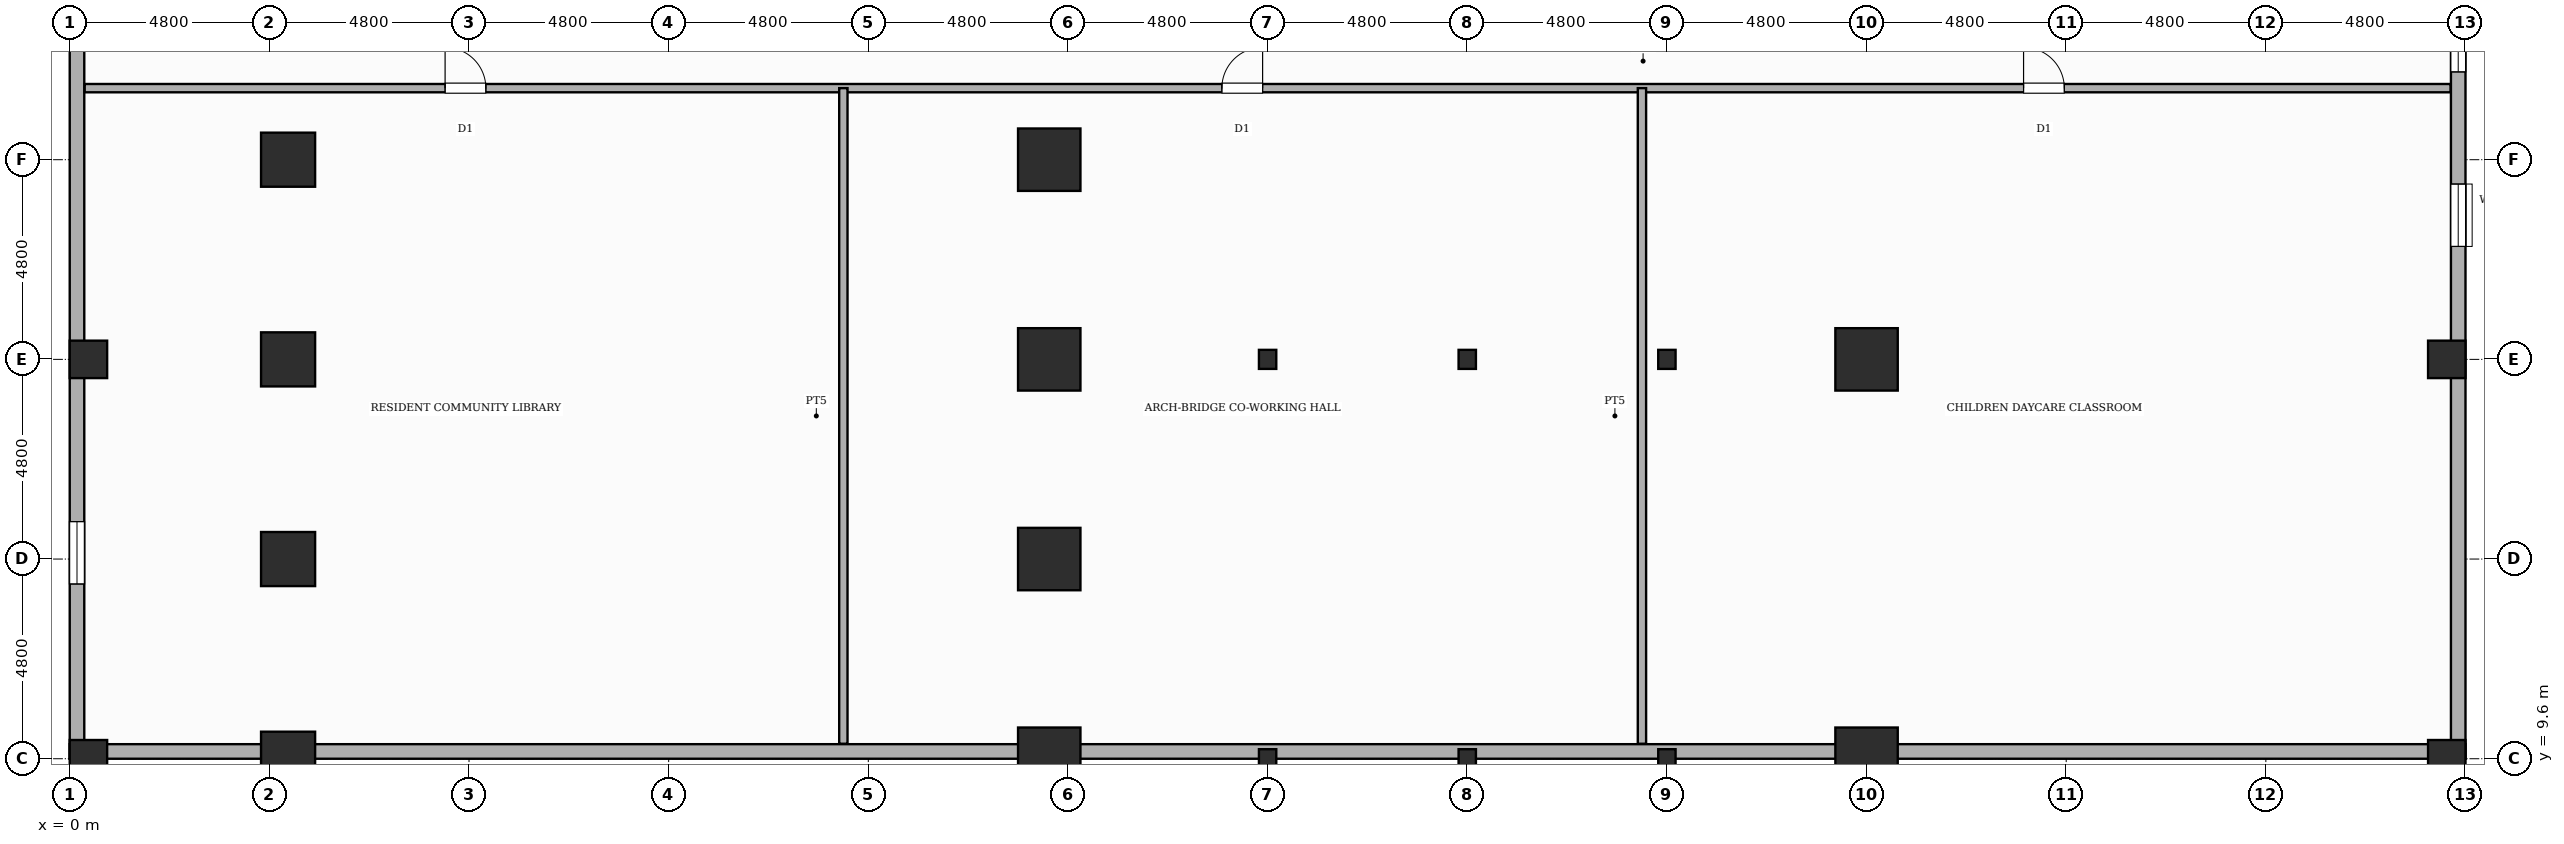
"""IFC4 building model, lengths in metres.
Left out: names, types, materials, properties, quantities, classifications, styles, units other than length and angle.
Written with IfcOpenShell. Run it as: python <this file> out.ifc"""

import sys

from ifc_helpers import new_model, si_unit, direction, frame, frame_2d, origin, origin_2d, place, context, subcontext, project, spatial, rectangle, circle, i_section, extrude, element, fill, save


model = new_model("IFC4")
c1 = context("Model", 3, precision=1e-05, world=origin(), true_north=direction((0.0, 1.0)))
c2 = subcontext(c1, "Body", "Model", "MODEL_VIEW")
j1 = project(units=[si_unit("LENGTHUNIT", "METRE"), si_unit("PLANEANGLEUNIT", "RADIAN")], contexts=[c1])
p1 = place(None, origin())
s1 = spatial("IfcSite", under=j1, at=p1, CompositionType="ELEMENT")
p2 = place(p1, origin())
s2 = spatial("IfcBuilding", under=s1, at=p2, CompositionType="ELEMENT")
p3 = place(p2, frame((0.0, 0.0, 14.8)))
s3 = spatial("IfcBuildingStorey", under=s2, at=p3, CompositionType="ELEMENT", Elevation=14.8)
for number, where, z_axis, x_axis in (
    (1, (0.45, 9.6, 0.0), (0.0, 0.0, 1.0), (1.0, 0.0, 0.0)),
    (2, (0.45, 19.2, 0.0), (0.0, 0.0, 1.0), (1.0, 0.0, 0.0)),
):
    element("IfcColumn", number, at=place(p3, frame(where, z_axis=z_axis, x_axis=x_axis)), inside=s3, PredefinedType="COLUMN", context=c2, shape_type="SweptSolid", body=[
        extrude(circle(Radius=0.45, at=origin_2d()), origin(), (0.0, 0.0, 1.0), 4.8),
    ])
for number, where, z_axis, x_axis in (
    (3, (5.25, 9.6, 0.0), (0.0, 0.0, 1.0), (1.0, 0.0, 0.0)),
    (4, (5.25, 14.4, 0.0), (0.0, 0.0, 1.0), (1.0, 0.0, 0.0)),
    (5, (5.25, 19.2, 0.0), (0.0, 0.0, 1.0), (1.0, 0.0, 0.0)),
    (6, (5.25, 24.0, 0.0), (0.0, 0.0, 1.0), (1.0, 0.0, 0.0)),
):
    element("IfcColumn", number, at=place(p3, frame(where, z_axis=z_axis, x_axis=x_axis)), inside=s3, PredefinedType="COLUMN", context=c2, shape_type="SweptSolid", body=[
        extrude(rectangle(XDim=1.3, YDim=1.3, at=origin_2d()), origin(), (0.0, 0.0, 1.0), 4.8),
    ])
for number, where, z_axis, x_axis in (
    (7, (23.55, 9.6, 0.0), (0.0, 0.0, 1.0), (1.0, 0.0, 0.0)),
    (8, (23.55, 14.4, 0.0), (0.0, 0.0, 1.0), (1.0, 0.0, 0.0)),
    (9, (23.55, 19.2, 0.0), (0.0, 0.0, 1.0), (1.0, 0.0, 0.0)),
    (10, (23.55, 24.0, 0.0), (0.0, 0.0, 1.0), (1.0, 0.0, 0.0)),
):
    element("IfcColumn", number, at=place(p3, frame(where, z_axis=z_axis, x_axis=x_axis)), inside=s3, PredefinedType="USERDEFINED", context=c2, shape_type="SweptSolid", body=[
        extrude(rectangle(XDim=1.5, YDim=1.5, at=origin_2d()), origin(), (0.0, 0.0, 1.0), 4.8),
    ])
for number, where, z_axis, x_axis in (
    (11, (28.8, 9.6, 0.0), (0.0, 0.0, 1.0), (1.0, 0.0, 0.0)),
    (12, (28.8, 19.2, 0.0), (0.0, 0.0, 1.0), (1.0, 0.0, 0.0)),
    (13, (33.6, 9.6, 0.0), (0.0, 0.0, 1.0), (1.0, 0.0, 0.0)),
    (14, (33.6, 19.2, 0.0), (0.0, 0.0, 1.0), (1.0, 0.0, 0.0)),
    (15, (38.4, 9.6, 0.0), (0.0, 0.0, 1.0), (1.0, 0.0, 0.0)),
    (16, (38.4, 19.2, 0.0), (0.0, 0.0, 1.0), (1.0, 0.0, 0.0)),
):
    element("IfcColumn", number, at=place(p3, frame(where, z_axis=z_axis, x_axis=x_axis)), inside=s3, PredefinedType="COLUMN", context=c2, shape_type="SweptSolid", body=[
        extrude(i_section(OverallWidth=0.417, OverallDepth=0.458, WebThickness=0.03, FlangeThickness=0.045, FilletRadius=0.022, at=origin_2d()), origin(), (0.0, 0.0, 1.0), 4.8),
    ])
for number, where, z_axis, x_axis in (
    (17, (43.2, 9.6, 0.0), (0.0, 0.0, 1.0), (1.0, 0.0, 0.0)),
    (18, (43.2, 19.2, 0.0), (0.0, 0.0, 1.0), (1.0, 0.0, 0.0)),
):
    element("IfcColumn", number, at=place(p3, frame(where, z_axis=z_axis, x_axis=x_axis)), inside=s3, PredefinedType="USERDEFINED", context=c2, shape_type="SweptSolid", body=[
        extrude(rectangle(XDim=1.5, YDim=1.5, at=origin_2d()), origin(), (0.0, 0.0, 1.0), 4.8),
    ])
for number, where, z_axis, x_axis in (
    (19, (57.15, 9.6, 0.0), (0.0, 0.0, 1.0), (1.0, 0.0, 0.0)),
    (20, (57.15, 19.2, 0.0), (0.0, 0.0, 1.0), (1.0, 0.0, 0.0)),
):
    element("IfcColumn", number, at=place(p3, frame(where, z_axis=z_axis, x_axis=x_axis)), inside=s3, PredefinedType="COLUMN", context=c2, shape_type="SweptSolid", body=[
        extrude(circle(Radius=0.45, at=origin_2d()), origin(), (0.0, 0.0, 1.0), 4.8),
    ])
p4 = place(p3, frame((57.425, 48.0, 0.0), z_axis=(0.0, 0.0, 1.0), x_axis=(0.0, -1.0, 0.0)))
e21 = element("IfcWall", 21, at=p4, inside=s3, PredefinedType="STANDARD", context=c2, shape_type="SweptSolid", body=[
    extrude(rectangle(XDim=38.4, YDim=0.35, at=frame_2d((19.2, 0.0))), origin(), (0.0, 0.0, 1.0), 3.48),
])
p5 = place(p4, frame((20.39, 0.0, 0.85)))
e22 = element("IfcOpeningElement", 22, at=p5, cuts=e21, PredefinedType="OPENING", context=c2, shape_type="SweptSolid", body=[
    extrude(rectangle(XDim=1.5, YDim=2.1, at=frame_2d((0.75, 1.05))), frame((0.0, 0.185, 0.0), z_axis=(0.0, -1.0, 0.0), x_axis=(1.0, 0.0, 0.0)), (0.0, 0.0, 1.0), 0.37),
])
p6 = place(p4, frame((2.0, 0.0, 0.85)))
e23 = element("IfcOpeningElement", 23, at=p6, cuts=e21, PredefinedType="OPENING", context=c2, shape_type="SweptSolid", body=[
    extrude(rectangle(XDim=1.5, YDim=2.1, at=frame_2d((0.75, 1.05))), frame((0.0, 0.185, 0.0), z_axis=(0.0, -1.0, 0.0), x_axis=(1.0, 0.0, 0.0)), (0.0, 0.0, 1.0), 0.37),
])
p7 = place(p4, frame((24.585, 0.0, 0.85)))
e24 = element("IfcOpeningElement", 24, at=p7, cuts=e21, PredefinedType="OPENING", context=c2, shape_type="SweptSolid", body=[
    extrude(rectangle(XDim=1.5, YDim=2.1, at=frame_2d((0.75, 1.05))), frame((0.0, 0.185, 0.0), z_axis=(0.0, -1.0, 0.0), x_axis=(1.0, 0.0, 0.0)), (0.0, 0.0, 1.0), 0.37),
])
p8 = place(p3, frame((57.6, 9.775, 0.0), z_axis=(0.0, 0.0, 1.0), x_axis=(-1.0, 0.0, 0.0)))
e25 = element("IfcWall", 25, at=p8, inside=s3, PredefinedType="STANDARD", context=c2, shape_type="SweptSolid", body=[
    extrude(rectangle(XDim=57.6, YDim=0.35, at=frame_2d((28.8, 0.0))), origin(), (0.0, 0.0, 1.0), 2.98),
])
p9 = place(p3, frame((0.175, 9.6, 0.0), z_axis=(0.0, 0.0, 1.0), x_axis=(0.0, 1.0, 0.0)))
e26 = element("IfcWall", 26, at=p9, inside=s3, PredefinedType="STANDARD", context=c2, shape_type="SweptSolid", body=[
    extrude(rectangle(XDim=38.4, YDim=0.35, at=frame_2d((19.2, 0.0))), origin(), (0.0, 0.0, 1.0), 3.48),
])
p10 = place(p9, frame((4.2, 0.0, 0.85)))
e27 = element("IfcOpeningElement", 27, at=p10, cuts=e26, PredefinedType="OPENING", context=c2, shape_type="SweptSolid", body=[
    extrude(rectangle(XDim=1.5, YDim=2.1, at=frame_2d((0.75, 1.05))), frame((0.0, 0.185, 0.0), z_axis=(0.0, -1.0, 0.0), x_axis=(1.0, 0.0, 0.0)), (0.0, 0.0, 1.0), 0.37),
])
p11 = place(p3, frame((0.36, 25.72, 0.0), z_axis=(0.0, 0.0, 1.0), x_axis=(1.0, 0.0, 0.0)))
e28 = element("IfcWall", 28, at=p11, inside=s3, PredefinedType="PARTITIONING", context=c2, shape_type="SweptSolid", body=[
    extrude(rectangle(XDim=56.88, YDim=0.2, at=frame_2d((28.44, 0.0))), origin(), (0.0, 0.0, 1.0), 4.4),
])
p12 = place(p11, frame((8.665, 0.0, 0.0)))
e29 = element("IfcOpeningElement", 29, at=p12, cuts=e28, PredefinedType="OPENING", context=c2, shape_type="SweptSolid", body=[
    extrude(rectangle(XDim=0.98, YDim=2.18, at=frame_2d((0.49, 1.09))), frame((0.0, 0.11, 0.0), z_axis=(0.0, -1.0, 0.0), x_axis=(1.0, 0.0, 0.0)), (0.0, 0.0, 1.0), 0.22),
])
p13 = place(p11, frame((27.34, 0.0, 0.0)))
e30 = element("IfcOpeningElement", 30, at=p13, cuts=e28, PredefinedType="OPENING", context=c2, shape_type="SweptSolid", body=[
    extrude(rectangle(XDim=0.98, YDim=2.18, at=frame_2d((0.49, 1.09))), frame((0.0, 0.11, 0.0), z_axis=(0.0, -1.0, 0.0), x_axis=(1.0, 0.0, 0.0)), (0.0, 0.0, 1.0), 0.22),
])
p14 = place(p11, frame((46.615, 0.0, 0.0)))
e31 = element("IfcOpeningElement", 31, at=p14, cuts=e28, PredefinedType="OPENING", context=c2, shape_type="SweptSolid", body=[
    extrude(rectangle(XDim=0.98, YDim=2.18, at=frame_2d((0.49, 1.09))), frame((0.0, 0.11, 0.0), z_axis=(0.0, -1.0, 0.0), x_axis=(1.0, 0.0, 0.0)), (0.0, 0.0, 1.0), 0.22),
])
for number, where, z_axis, x_axis in (
    (32, (18.6, 9.96, 0.0), (0.0, 0.0, 1.0), (0.0, 1.0, 0.0)),
    (33, (37.8, 9.96, 0.0), (0.0, 0.0, 1.0), (0.0, 1.0, 0.0)),
):
    element("IfcWall", number, at=place(p3, frame(where, z_axis=z_axis, x_axis=x_axis)), inside=s3, PredefinedType="SOLIDWALL", context=c2, shape_type="SweptSolid", body=[
        extrude(rectangle(XDim=15.76, YDim=0.2, at=frame_2d((7.88, 0.0))), origin(), (0.0, 0.0, 1.0), 4.4),
    ])
p15 = place(p5, origin())
e34 = element("IfcWindow", 34, at=p15, inside=s3, PartitioningType="SINGLE_PANEL", PredefinedType="WINDOW", context=c2, shape_type="SweptSolid", body=[
    extrude(rectangle(XDim=1.5, YDim=2.1, at=frame_2d((0.75, 1.05))), frame((0.0, 0.03, 0.0), z_axis=(0.0, -1.0, 0.0), x_axis=(1.0, 0.0, 0.0)), (0.0, 0.0, 1.0), 0.06),
])
fill(e22, e34)
p16 = place(p7, origin())
e35 = element("IfcWindow", 35, at=p16, inside=s3, PartitioningType="SINGLE_PANEL", PredefinedType="WINDOW", context=c2, shape_type="SweptSolid", body=[
    extrude(rectangle(XDim=1.5, YDim=2.1, at=frame_2d((0.75, 1.05))), frame((0.0, 0.03, 0.0), z_axis=(0.0, -1.0, 0.0), x_axis=(1.0, 0.0, 0.0)), (0.0, 0.0, 1.0), 0.06),
])
fill(e24, e35)
p17 = place(p10, origin())
e36 = element("IfcWindow", 36, at=p17, inside=s3, PartitioningType="SINGLE_PANEL", PredefinedType="WINDOW", context=c2, shape_type="SweptSolid", body=[
    extrude(rectangle(XDim=1.5, YDim=2.1, at=frame_2d((0.75, 1.05))), frame((0.0, 0.03, 0.0), z_axis=(0.0, -1.0, 0.0), x_axis=(1.0, 0.0, 0.0)), (0.0, 0.0, 1.0), 0.06),
])
fill(e27, e36)
p18 = place(p12, origin())
e37 = element("IfcDoor", 37, at=p18, inside=s3, OperationType="SINGLE_SWING_LEFT", PredefinedType="DOOR", context=c2, shape_type="SweptSolid", body=[
    extrude(rectangle(XDim=0.98, YDim=2.18, at=frame_2d((0.49, 1.09))), frame((0.0, 0.025, 0.0), z_axis=(0.0, -1.0, 0.0), x_axis=(1.0, 0.0, 0.0)), (0.0, 0.0, 1.0), 0.05),
])
fill(e29, e37)
p19 = place(p13, origin())
e38 = element("IfcDoor", 38, at=p19, inside=s3, OperationType="SINGLE_SWING_RIGHT", PredefinedType="DOOR", context=c2, shape_type="SweptSolid", body=[
    extrude(rectangle(XDim=0.98, YDim=2.18, at=frame_2d((0.49, 1.09))), frame((0.0, 0.025, 0.0), z_axis=(0.0, -1.0, 0.0), x_axis=(1.0, 0.0, 0.0)), (0.0, 0.0, 1.0), 0.05),
])
fill(e30, e38)
p20 = place(p14, origin())
e39 = element("IfcDoor", 39, at=p20, inside=s3, OperationType="SINGLE_SWING_LEFT", PredefinedType="DOOR", context=c2, shape_type="SweptSolid", body=[
    extrude(rectangle(XDim=0.98, YDim=2.18, at=frame_2d((0.49, 1.09))), frame((0.0, 0.025, 0.0), z_axis=(0.0, -1.0, 0.0), x_axis=(1.0, 0.0, 0.0)), (0.0, 0.0, 1.0), 0.05),
])
fill(e31, e39)
save(model, sys.argv[1])
